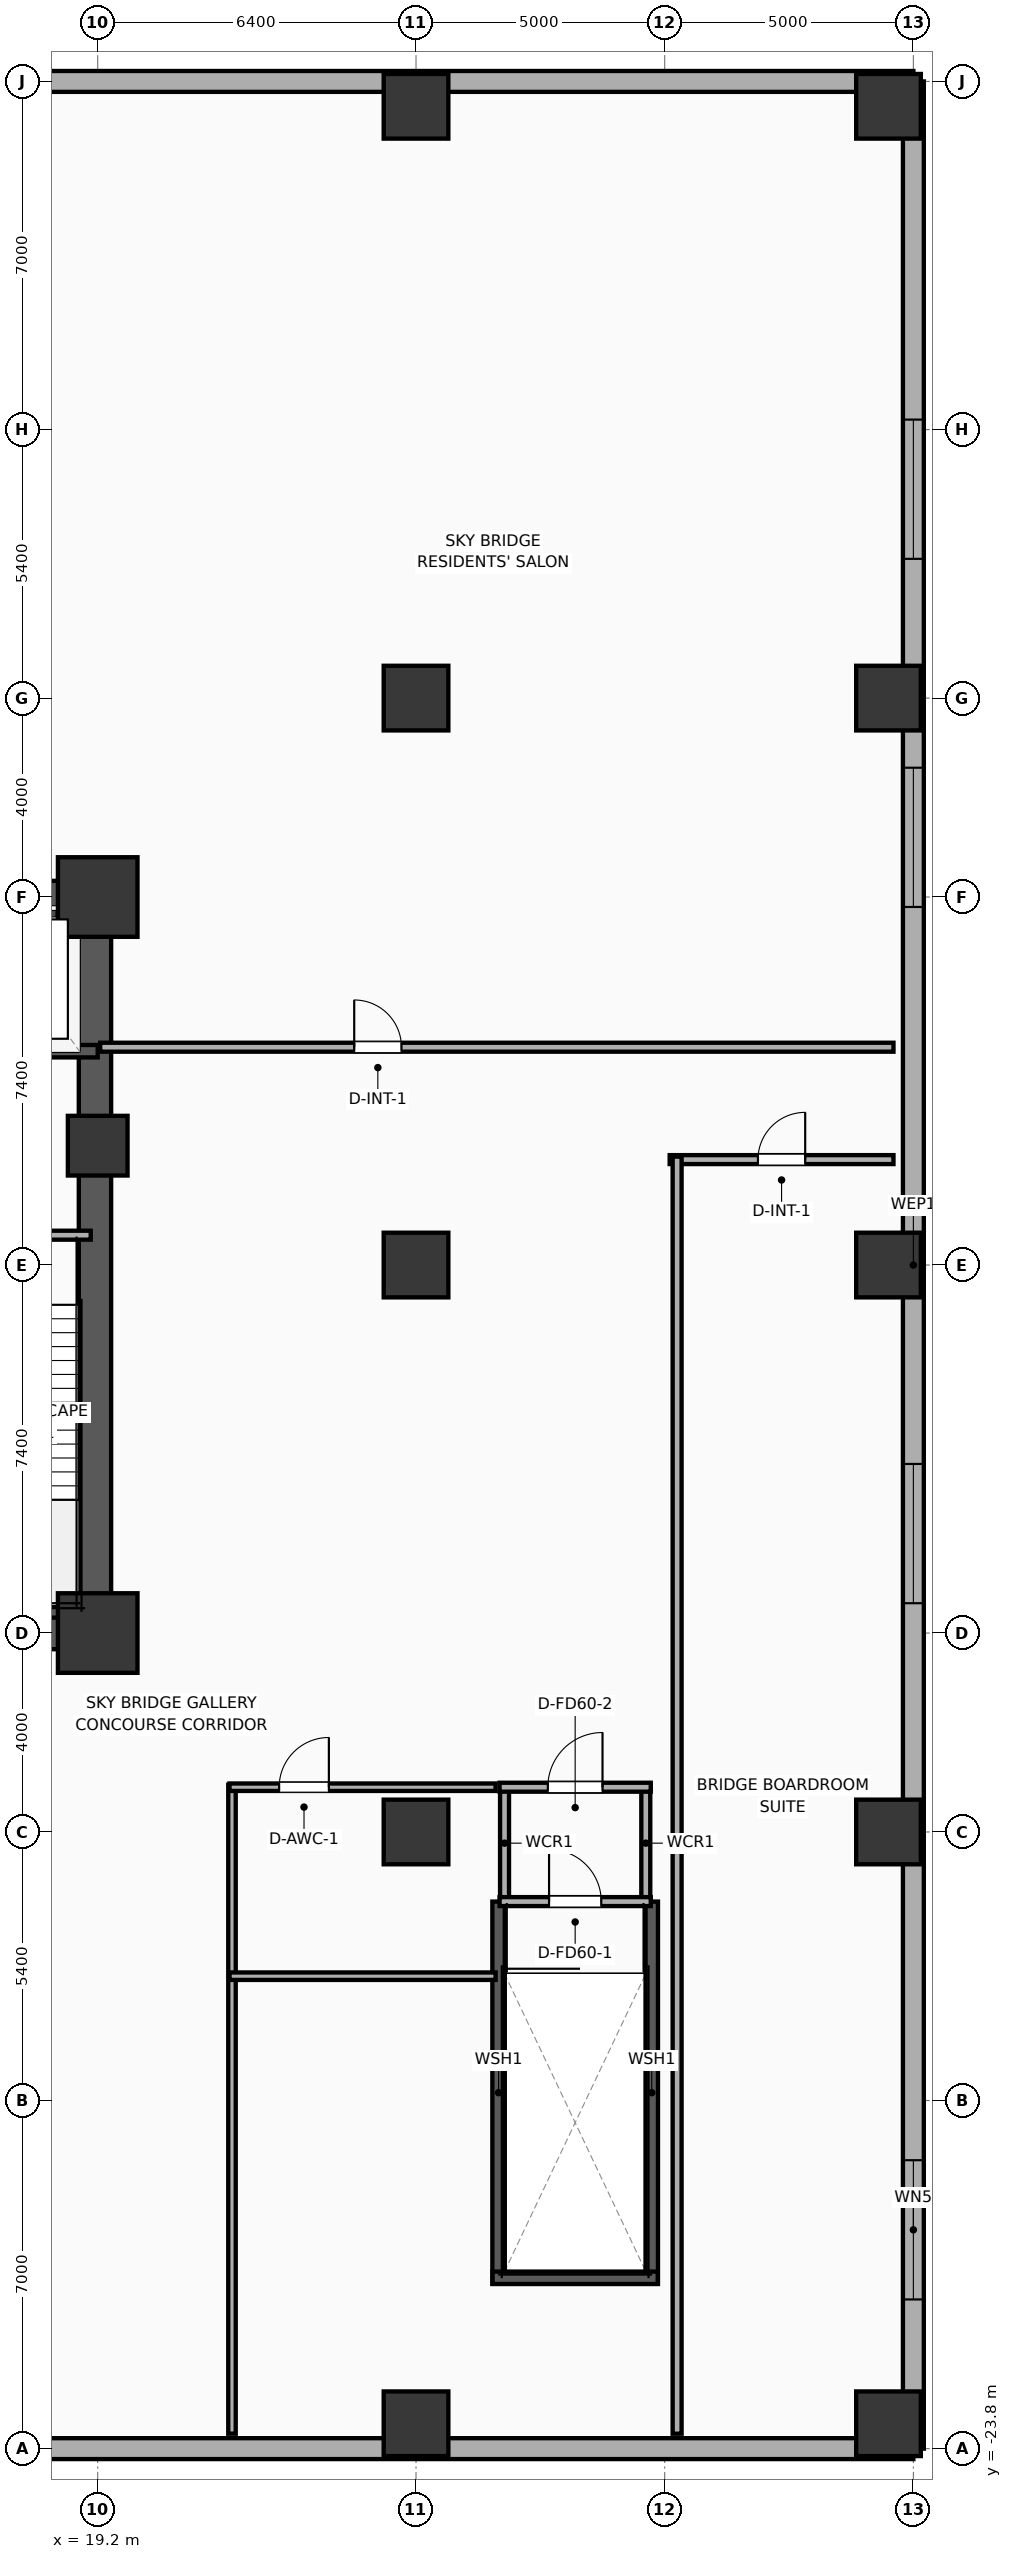
"""IFC4 building model, lengths in metres.
Left out: names, types, materials, properties, quantities, classifications, styles, units other than length and angle.
Written with IfcOpenShell. Run it as: python <this file> out.ifc"""

import sys

from ifc_helpers import new_model, si_unit, direction, frame, frame_2d, origin, origin_2d, place, context, subcontext, project, spatial, rectangle, extrude, element, fill, save


model = new_model("IFC4")
c1 = context("Model", 3, precision=1e-05, world=origin(), true_north=direction((0.0, 1.0)))
c2 = subcontext(c1, "Body", "Model", "MODEL_VIEW")
j1 = project(units=[si_unit("LENGTHUNIT", "METRE"), si_unit("PLANEANGLEUNIT", "RADIAN")], contexts=[c1])
p1 = place(None, origin())
s1 = spatial("IfcSite", under=j1, at=p1, CompositionType="ELEMENT")
p2 = place(p1, origin())
s2 = spatial("IfcBuilding", under=s1, at=p2, CompositionType="ELEMENT")
p3 = place(p2, frame((0.0, 0.0, 20.8)))
s3 = spatial("IfcBuildingStorey", under=s2, at=p3, CompositionType="ELEMENT", Elevation=20.8)
p4 = place(p3, frame((19.2, -7.4, 0.0), z_axis=(0.0, 0.0, 1.0), x_axis=(1.0, 0.0, 0.0)))
e1 = element("IfcColumn", 1, at=p4, inside=s3, PredefinedType="COLUMN", context=c2, shape_type="SweptSolid", body=[
    extrude(rectangle(XDim=1.6, YDim=1.6, at=origin_2d()), origin(), (0.0, 0.0, 1.0), 5.2),
])
p5 = place(p3, frame((19.2, 2.4, 0.0), z_axis=(0.0, 0.0, 1.0), x_axis=(1.0, 0.0, 0.0)))
e2 = element("IfcColumn", 2, at=p5, inside=s3, PredefinedType="COLUMN", context=c2, shape_type="SweptSolid", body=[
    extrude(rectangle(XDim=1.2, YDim=1.2, at=origin_2d()), origin(), (0.0, 0.0, 1.0), 5.2),
])
p6 = place(p3, frame((19.2, 7.4, 0.0), z_axis=(0.0, 0.0, 1.0), x_axis=(1.0, 0.0, 0.0)))
e3 = element("IfcColumn", 3, at=p6, inside=s3, PredefinedType="COLUMN", context=c2, shape_type="SweptSolid", body=[
    extrude(rectangle(XDim=1.6, YDim=1.6, at=origin_2d()), origin(), (0.0, 0.0, 1.0), 5.2),
])
for number, where, z_axis, x_axis in (
    (4, (12.075, -7.4, 0.0), (0.0, 0.0, 1.0), (1.0, 0.0, 0.0)),
    (5, (12.075, 7.4, 0.0), (0.0, 0.0, 1.0), (1.0, 0.0, 0.0)),
):
    element("IfcWall", number, at=place(p3, frame(where, z_axis=z_axis, x_axis=x_axis)), inside=s3, PredefinedType="SHEAR", context=c2, shape_type="SweptSolid", body=[
        extrude(rectangle(XDim=7.45, YDim=0.65, at=frame_2d((3.725, 0.0))), origin(), (0.0, 0.0, 1.0), 4.95),
    ])
p7 = place(p3, frame((19.145, -7.4, 0.0), z_axis=(0.0, 0.0, 1.0), x_axis=(0.0, 1.0, 0.0)))
e6 = element("IfcWall", 6, at=p7, inside=s3, PredefinedType="SHEAR", context=c2, shape_type="SweptSolid", body=[
    extrude(rectangle(XDim=14.8, YDim=0.65, at=frame_2d((7.4, 0.0))), origin(), (0.0, 0.0, 1.0), 4.95),
])
p8 = place(p3, frame((15.74, -6.965, 0.0), z_axis=(0.0, 0.0, 1.0), x_axis=(1.0, 0.0, 0.0)))
e7 = element("IfcWall", 7, at=p8, inside=s3, PredefinedType="SOLIDWALL", context=c2, shape_type="SweptSolid", body=[
    extrude(rectangle(XDim=3.46, YDim=0.25, at=frame_2d((1.73, 0.0))), origin(), (0.0, 0.0, 1.0), 4.95),
])
for number, where, z_axis, x_axis in (
    (8, (27.26, -20.485, 0.0), (0.0, 0.0, 1.0), (0.0, 1.0, 0.0)),
    (9, (30.34, -20.485, 0.0), (0.0, 0.0, 1.0), (0.0, 1.0, 0.0)),
):
    element("IfcWall", number, at=place(p3, frame(where, z_axis=z_axis, x_axis=x_axis)), inside=s3, PredefinedType="SOLIDWALL", context=c2, shape_type="SweptSolid", body=[
        extrude(rectangle(XDim=7.685, YDim=0.25, at=frame_2d((3.843, 0.0))), origin(), (0.0, 0.0, 1.0), 4.95),
    ])
p9 = place(p3, frame((27.14, -20.365, 0.0), z_axis=(0.0, 0.0, 1.0), x_axis=(1.0, 0.0, 0.0)))
e10 = element("IfcWall", 10, at=p9, inside=s3, PredefinedType="SOLIDWALL", context=c2, shape_type="SweptSolid", body=[
    extrude(rectangle(XDim=3.32, YDim=0.25, at=frame_2d((1.66, 0.0))), origin(), (0.0, 0.0, 1.0), 4.95),
])
for number, where, z_axis, x_axis in (
    (11, (25.6, -23.3, 0.0), (0.0, 0.0, 1.0), (1.0, 0.0, 0.0)),
    (12, (25.6, -11.4, 0.0), (0.0, 0.0, 1.0), (1.0, 0.0, 0.0)),
    (13, (25.6, 0.0, 0.0), (0.0, 0.0, 1.0), (1.0, 0.0, 0.0)),
    (14, (25.6, 11.4, 0.0), (0.0, 0.0, 1.0), (1.0, 0.0, 0.0)),
    (15, (25.6, 23.3, 0.0), (0.0, 0.0, 1.0), (1.0, 0.0, 0.0)),
    (16, (35.1, -23.3, 0.0), (0.0, 0.0, 1.0), (1.0, 0.0, 0.0)),
    (17, (35.1, -11.4, 0.0), (0.0, 0.0, 1.0), (1.0, 0.0, 0.0)),
    (18, (35.1, 0.0, 0.0), (0.0, 0.0, 1.0), (1.0, 0.0, 0.0)),
    (19, (35.1, 11.4, 0.0), (0.0, 0.0, 1.0), (1.0, 0.0, 0.0)),
    (20, (35.1, 23.3, 0.0), (0.0, 0.0, 1.0), (1.0, 0.0, 0.0)),
):
    element("IfcColumn", number, at=place(p3, frame(where, z_axis=z_axis, x_axis=x_axis)), inside=s3, PredefinedType="COLUMN", context=c2, shape_type="SweptSolid", body=[
        extrude(rectangle(XDim=1.3, YDim=1.3, at=origin_2d()), origin(), (0.0, 0.0, 1.0), 5.2),
    ])
p10 = place(p3, frame((13.55, -23.8, 0.0), z_axis=(0.0, 0.0, 1.0), x_axis=(1.0, 0.0, 0.0)))
e21 = element("IfcWall", 21, at=p10, inside=s3, PredefinedType="ELEMENTEDWALL", context=c2, shape_type="SweptSolid", body=[
    extrude(rectangle(XDim=22.05, YDim=0.42, at=frame_2d((11.025, 0.0))), origin(), (0.0, 0.0, 1.0), 3.84),
])
p11 = place(p3, frame((35.6, -23.8, 0.0), z_axis=(0.0, 0.0, 1.0), x_axis=(0.0, 1.0, 0.0)))
e22 = element("IfcWall", 22, at=p11, inside=s3, PredefinedType="ELEMENTEDWALL", context=c2, shape_type="SweptSolid", body=[
    extrude(rectangle(XDim=47.6, YDim=0.42, at=frame_2d((23.8, 0.0))), origin(), (0.0, 0.0, 1.0), 4.95),
])
p12 = place(p11, frame((3.0, 0.0, 0.65)))
e23 = element("IfcOpeningElement", 23, at=p12, cuts=e22, PredefinedType="OPENING", context=c2, shape_type="SweptSolid", body=[
    extrude(rectangle(XDim=2.8, YDim=2.6, at=frame_2d((1.4, 1.3))), frame((0.0, 0.22, 0.0), z_axis=(0.0, -1.0, 0.0), x_axis=(1.0, 0.0, 0.0)), (0.0, 0.0, 1.0), 0.44),
])
p13 = place(p11, frame((17.0, 0.0, 0.65)))
e24 = element("IfcOpeningElement", 24, at=p13, cuts=e22, PredefinedType="OPENING", context=c2, shape_type="SweptSolid", body=[
    extrude(rectangle(XDim=2.8, YDim=2.6, at=frame_2d((1.4, 1.3))), frame((0.0, 0.22, 0.0), z_axis=(0.0, -1.0, 0.0), x_axis=(1.0, 0.0, 0.0)), (0.0, 0.0, 1.0), 0.44),
])
p14 = place(p11, frame((31.0, 0.0, 0.65)))
e25 = element("IfcOpeningElement", 25, at=p14, cuts=e22, PredefinedType="OPENING", context=c2, shape_type="SweptSolid", body=[
    extrude(rectangle(XDim=2.8, YDim=2.6, at=frame_2d((1.4, 1.3))), frame((0.0, 0.22, 0.0), z_axis=(0.0, -1.0, 0.0), x_axis=(1.0, 0.0, 0.0)), (0.0, 0.0, 1.0), 0.44),
])
p15 = place(p11, frame((38.0, 0.0, 0.65)))
e26 = element("IfcOpeningElement", 26, at=p15, cuts=e22, PredefinedType="OPENING", context=c2, shape_type="SweptSolid", body=[
    extrude(rectangle(XDim=2.8, YDim=2.6, at=frame_2d((1.4, 1.3))), frame((0.0, 0.22, 0.0), z_axis=(0.0, -1.0, 0.0), x_axis=(1.0, 0.0, 0.0)), (0.0, 0.0, 1.0), 0.44),
])
p16 = place(p3, frame((13.55, 23.8, 0.0), z_axis=(0.0, 0.0, 1.0), x_axis=(1.0, 0.0, 0.0)))
e27 = element("IfcWall", 27, at=p16, inside=s3, PredefinedType="ELEMENTEDWALL", context=c2, shape_type="SweptSolid", body=[
    extrude(rectangle(XDim=22.05, YDim=0.42, at=frame_2d((11.025, 0.0))), origin(), (0.0, 0.0, 1.0), 3.84),
])
p17 = place(p3, frame((16.6, 4.3, 0.0), z_axis=(0.0, 0.0, 1.0), x_axis=(1.0, 0.0, 0.0)))
e28 = element("IfcWall", 28, at=p17, inside=s3, PredefinedType="SOLIDWALL", context=c2, shape_type="SweptSolid", body=[
    extrude(rectangle(XDim=2.6, YDim=0.25, at=frame_2d((1.3, 0.0))), origin(), (0.0, 0.0, 1.0), 4.95),
])
p18 = place(p3, frame((15.7, 0.6, 0.0), z_axis=(0.0, 0.0, 1.0), x_axis=(1.0, 0.0, 0.0)))
e29 = element("IfcWall", 29, at=p18, inside=s3, PredefinedType="PARTITIONING", context=c2, shape_type="SweptSolid", body=[
    extrude(rectangle(XDim=3.36, YDim=0.18, at=frame_2d((1.68, 0.0))), origin(), (0.0, 0.0, 1.0), 4.95),
])
p19 = place(p18, frame((1.155, 0.0, 0.0)))
e30 = element("IfcOpeningElement", 30, at=p19, cuts=e29, PredefinedType="OPENING", context=c2, shape_type="SweptSolid", body=[
    extrude(rectangle(XDim=1.05, YDim=2.05, at=frame_2d((0.525, 1.025))), frame((0.0, 0.1, 0.0), z_axis=(0.0, -1.0, 0.0), x_axis=(1.0, 0.0, 0.0)), (0.0, 0.0, 1.0), 0.2),
])
for number, where, z_axis, x_axis in (
    (31, (27.38, -12.8, 0.0), (0.0, 0.0, 1.0), (0.0, 1.0, 0.0)),
    (32, (30.22, -12.8, 0.0), (0.0, 0.0, 1.0), (0.0, 1.0, 0.0)),
):
    element("IfcWall", number, at=place(p3, frame(where, z_axis=z_axis, x_axis=x_axis)), inside=s3, PredefinedType="PARTITIONING", context=c2, shape_type="SweptSolid", body=[
        extrude(rectangle(XDim=2.35, YDim=0.18, at=frame_2d((1.175, 0.0))), origin(), (0.0, 0.0, 1.0), 4.95),
    ])
p20 = place(p3, frame((27.28, -12.8, 0.0), z_axis=(0.0, 0.0, 1.0), x_axis=(1.0, 0.0, 0.0)))
e33 = element("IfcWall", 33, at=p20, inside=s3, PredefinedType="PARTITIONING", context=c2, shape_type="SweptSolid", body=[
    extrude(rectangle(XDim=3.04, YDim=0.18, at=frame_2d((1.52, 0.0))), origin(), (0.0, 0.0, 1.0), 4.95),
])
p21 = place(p20, frame((0.995, 0.0, 0.0)))
e34 = element("IfcOpeningElement", 34, at=p21, cuts=e33, PredefinedType="OPENING", context=c2, shape_type="SweptSolid", body=[
    extrude(rectangle(XDim=1.05, YDim=2.05, at=frame_2d((0.525, 1.025))), frame((0.0, 0.1, 0.0), z_axis=(0.0, -1.0, 0.0), x_axis=(1.0, 0.0, 0.0)), (0.0, 0.0, 1.0), 0.2),
])
p22 = place(p3, frame((27.28, -10.5, 0.0), z_axis=(0.0, 0.0, 1.0), x_axis=(1.0, 0.0, 0.0)))
e35 = element("IfcWall", 35, at=p22, inside=s3, PredefinedType="PARTITIONING", context=c2, shape_type="SweptSolid", body=[
    extrude(rectangle(XDim=3.04, YDim=0.18, at=frame_2d((1.52, 0.0))), origin(), (0.0, 0.0, 1.0), 4.95),
])
p23 = place(p22, frame((0.97, 0.0, 0.0)))
e36 = element("IfcOpeningElement", 36, at=p23, cuts=e35, PredefinedType="OPENING", context=c2, shape_type="SweptSolid", body=[
    extrude(rectangle(XDim=1.1, YDim=2.05, at=frame_2d((0.55, 1.025))), frame((0.0, 0.1, 0.0), z_axis=(0.0, -1.0, 0.0), x_axis=(1.0, 0.0, 0.0)), (0.0, 0.0, 1.0), 0.2),
])
p24 = place(p3, frame((30.7, 2.12, 0.0), z_axis=(0.0, 0.0, 1.0), x_axis=(1.0, 0.0, 0.0)))
e37 = element("IfcWall", 37, at=p24, inside=s3, PredefinedType="PARTITIONING", context=c2, shape_type="SweptSolid", body=[
    extrude(rectangle(XDim=4.5, YDim=0.18, at=frame_2d((2.25, 0.0))), origin(), (0.0, 0.0, 1.0), 4.95),
])
p25 = place(p24, frame((1.775, 0.0, 0.0)))
e38 = element("IfcOpeningElement", 38, at=p25, cuts=e37, PredefinedType="OPENING", context=c2, shape_type="SweptSolid", body=[
    extrude(rectangle(XDim=0.95, YDim=2.05, at=frame_2d((0.475, 1.025))), frame((0.0, 0.1, 0.0), z_axis=(0.0, -1.0, 0.0), x_axis=(1.0, 0.0, 0.0)), (0.0, 0.0, 1.0), 0.2),
])
p26 = place(p3, frame((30.85, -23.5, 0.0), z_axis=(0.0, 0.0, 1.0), x_axis=(0.0, 1.0, 0.0)))
e39 = element("IfcWall", 39, at=p26, inside=s3, PredefinedType="PARTITIONING", context=c2, shape_type="SweptSolid", body=[
    extrude(rectangle(XDim=25.68, YDim=0.18, at=frame_2d((12.84, 0.0))), origin(), (0.0, 0.0, 1.0), 4.95),
])
p27 = place(p3, frame((19.25, 4.38, 0.0), z_axis=(0.0, 0.0, 1.0), x_axis=(1.0, 0.0, 0.0)))
e40 = element("IfcWall", 40, at=p27, inside=s3, PredefinedType="PARTITIONING", context=c2, shape_type="SweptSolid", body=[
    extrude(rectangle(XDim=15.95, YDim=0.18, at=frame_2d((7.975, 0.0))), origin(), (0.0, 0.0, 1.0), 4.95),
])
p28 = place(p27, frame((5.107, 0.0, 0.0)))
e41 = element("IfcOpeningElement", 41, at=p28, cuts=e40, PredefinedType="OPENING", context=c2, shape_type="SweptSolid", body=[
    extrude(rectangle(XDim=0.95, YDim=2.05, at=frame_2d((0.475, 1.025))), frame((0.0, 0.1, 0.0), z_axis=(0.0, -1.0, 0.0), x_axis=(1.0, 0.0, 0.0)), (0.0, 0.0, 1.0), 0.2),
])
p29 = place(p3, frame((21.9, -23.5, 0.0), z_axis=(0.0, 0.0, 1.0), x_axis=(0.0, 1.0, 0.0)))
e42 = element("IfcWall", 42, at=p29, inside=s3, PredefinedType="PLUMBINGWALL", context=c2, shape_type="SweptSolid", body=[
    extrude(rectangle(XDim=13.05, YDim=0.15, at=frame_2d((6.525, 0.0))), origin(), (0.0, 0.0, 1.0), 4.95),
])
p30 = place(p3, frame((21.85, -14.3, 0.0), z_axis=(0.0, 0.0, 1.0), x_axis=(1.0, 0.0, 0.0)))
e43 = element("IfcWall", 43, at=p30, inside=s3, PredefinedType="PLUMBINGWALL", context=c2, shape_type="SweptSolid", body=[
    extrude(rectangle(XDim=5.35, YDim=0.15, at=frame_2d((2.675, 0.0))), origin(), (0.0, 0.0, 1.0), 4.95),
])
p31 = place(p3, frame((21.85, -10.5, 0.0), z_axis=(0.0, 0.0, 1.0), x_axis=(1.0, 0.0, 0.0)))
e44 = element("IfcWall", 44, at=p31, inside=s3, PredefinedType="PLUMBINGWALL", context=c2, shape_type="SweptSolid", body=[
    extrude(rectangle(XDim=5.35, YDim=0.15, at=frame_2d((2.675, 0.0))), origin(), (0.0, 0.0, 1.0), 4.95),
])
p32 = place(p31, frame((0.998, 0.0, 0.0)))
e45 = element("IfcOpeningElement", 45, at=p32, cuts=e44, PredefinedType="OPENING", context=c2, shape_type="SweptSolid", body=[
    extrude(rectangle(XDim=1.0, YDim=2.05, at=frame_2d((0.5, 1.025))), frame((0.0, 0.085, 0.0), z_axis=(0.0, -1.0, 0.0), x_axis=(1.0, 0.0, 0.0)), (0.0, 0.0, 1.0), 0.17),
])
p33 = place(p12, origin())
e46 = element("IfcWindow", 46, at=p33, inside=s3, PartitioningType="SINGLE_PANEL", PredefinedType="WINDOW", context=c2, shape_type="SweptSolid", body=[
    extrude(rectangle(XDim=2.8, YDim=2.6, at=frame_2d((1.4, 1.3))), frame((0.0, 0.03, 0.0), z_axis=(0.0, -1.0, 0.0), x_axis=(1.0, 0.0, 0.0)), (0.0, 0.0, 1.0), 0.06),
])
fill(e23, e46)
p34 = place(p13, origin())
e47 = element("IfcWindow", 47, at=p34, inside=s3, PartitioningType="SINGLE_PANEL", PredefinedType="WINDOW", context=c2, shape_type="SweptSolid", body=[
    extrude(rectangle(XDim=2.8, YDim=2.6, at=frame_2d((1.4, 1.3))), frame((0.0, 0.03, 0.0), z_axis=(0.0, -1.0, 0.0), x_axis=(1.0, 0.0, 0.0)), (0.0, 0.0, 1.0), 0.06),
])
fill(e24, e47)
p35 = place(p14, origin())
e48 = element("IfcWindow", 48, at=p35, inside=s3, PartitioningType="SINGLE_PANEL", PredefinedType="WINDOW", context=c2, shape_type="SweptSolid", body=[
    extrude(rectangle(XDim=2.8, YDim=2.6, at=frame_2d((1.4, 1.3))), frame((0.0, 0.03, 0.0), z_axis=(0.0, -1.0, 0.0), x_axis=(1.0, 0.0, 0.0)), (0.0, 0.0, 1.0), 0.06),
])
fill(e25, e48)
p36 = place(p15, origin())
e49 = element("IfcWindow", 49, at=p36, inside=s3, PartitioningType="SINGLE_PANEL", PredefinedType="WINDOW", context=c2, shape_type="SweptSolid", body=[
    extrude(rectangle(XDim=2.8, YDim=2.6, at=frame_2d((1.4, 1.3))), frame((0.0, 0.03, 0.0), z_axis=(0.0, -1.0, 0.0), x_axis=(1.0, 0.0, 0.0)), (0.0, 0.0, 1.0), 0.06),
])
fill(e26, e49)
p37 = place(p21, origin())
e50 = element("IfcDoor", 50, at=p37, inside=s3, OperationType="SINGLE_SWING_LEFT", PredefinedType="DOOR", context=c2, shape_type="SweptSolid", body=[
    extrude(rectangle(XDim=1.05, YDim=2.05, at=frame_2d((0.525, 1.025))), frame((0.0, 0.025, 0.0), z_axis=(0.0, -1.0, 0.0), x_axis=(1.0, 0.0, 0.0)), (0.0, 0.0, 1.0), 0.05),
])
fill(e34, e50)
p38 = place(p23, origin())
e51 = element("IfcDoor", 51, at=p38, inside=s3, OperationType="SINGLE_SWING_RIGHT", PredefinedType="DOOR", context=c2, shape_type="SweptSolid", body=[
    extrude(rectangle(XDim=1.1, YDim=2.05, at=frame_2d((0.55, 1.025))), frame((0.0, 0.025, 0.0), z_axis=(0.0, -1.0, 0.0), x_axis=(1.0, 0.0, 0.0)), (0.0, 0.0, 1.0), 0.05),
])
fill(e36, e51)
p39 = place(p25, origin())
e52 = element("IfcDoor", 52, at=p39, inside=s3, OperationType="SINGLE_SWING_RIGHT", PredefinedType="DOOR", context=c2, shape_type="SweptSolid", body=[
    extrude(rectangle(XDim=0.95, YDim=2.05, at=frame_2d((0.475, 1.025))), frame((0.0, 0.025, 0.0), z_axis=(0.0, -1.0, 0.0), x_axis=(1.0, 0.0, 0.0)), (0.0, 0.0, 1.0), 0.05),
])
fill(e38, e52)
p40 = place(p28, origin())
e53 = element("IfcDoor", 53, at=p40, inside=s3, OperationType="SINGLE_SWING_LEFT", PredefinedType="DOOR", context=c2, shape_type="SweptSolid", body=[
    extrude(rectangle(XDim=0.95, YDim=2.05, at=frame_2d((0.475, 1.025))), frame((0.0, 0.025, 0.0), z_axis=(0.0, -1.0, 0.0), x_axis=(1.0, 0.0, 0.0)), (0.0, 0.0, 1.0), 0.05),
])
fill(e41, e53)
p41 = place(p32, origin())
e54 = element("IfcDoor", 54, at=p41, inside=s3, OperationType="SINGLE_SWING_RIGHT", PredefinedType="DOOR", context=c2, shape_type="SweptSolid", body=[
    extrude(rectangle(XDim=1.0, YDim=2.05, at=frame_2d((0.5, 1.025))), frame((0.0, 0.025, 0.0), z_axis=(0.0, -1.0, 0.0), x_axis=(1.0, 0.0, 0.0)), (0.0, 0.0, 1.0), 0.05),
])
fill(e45, e54)
save(model, sys.argv[1])
